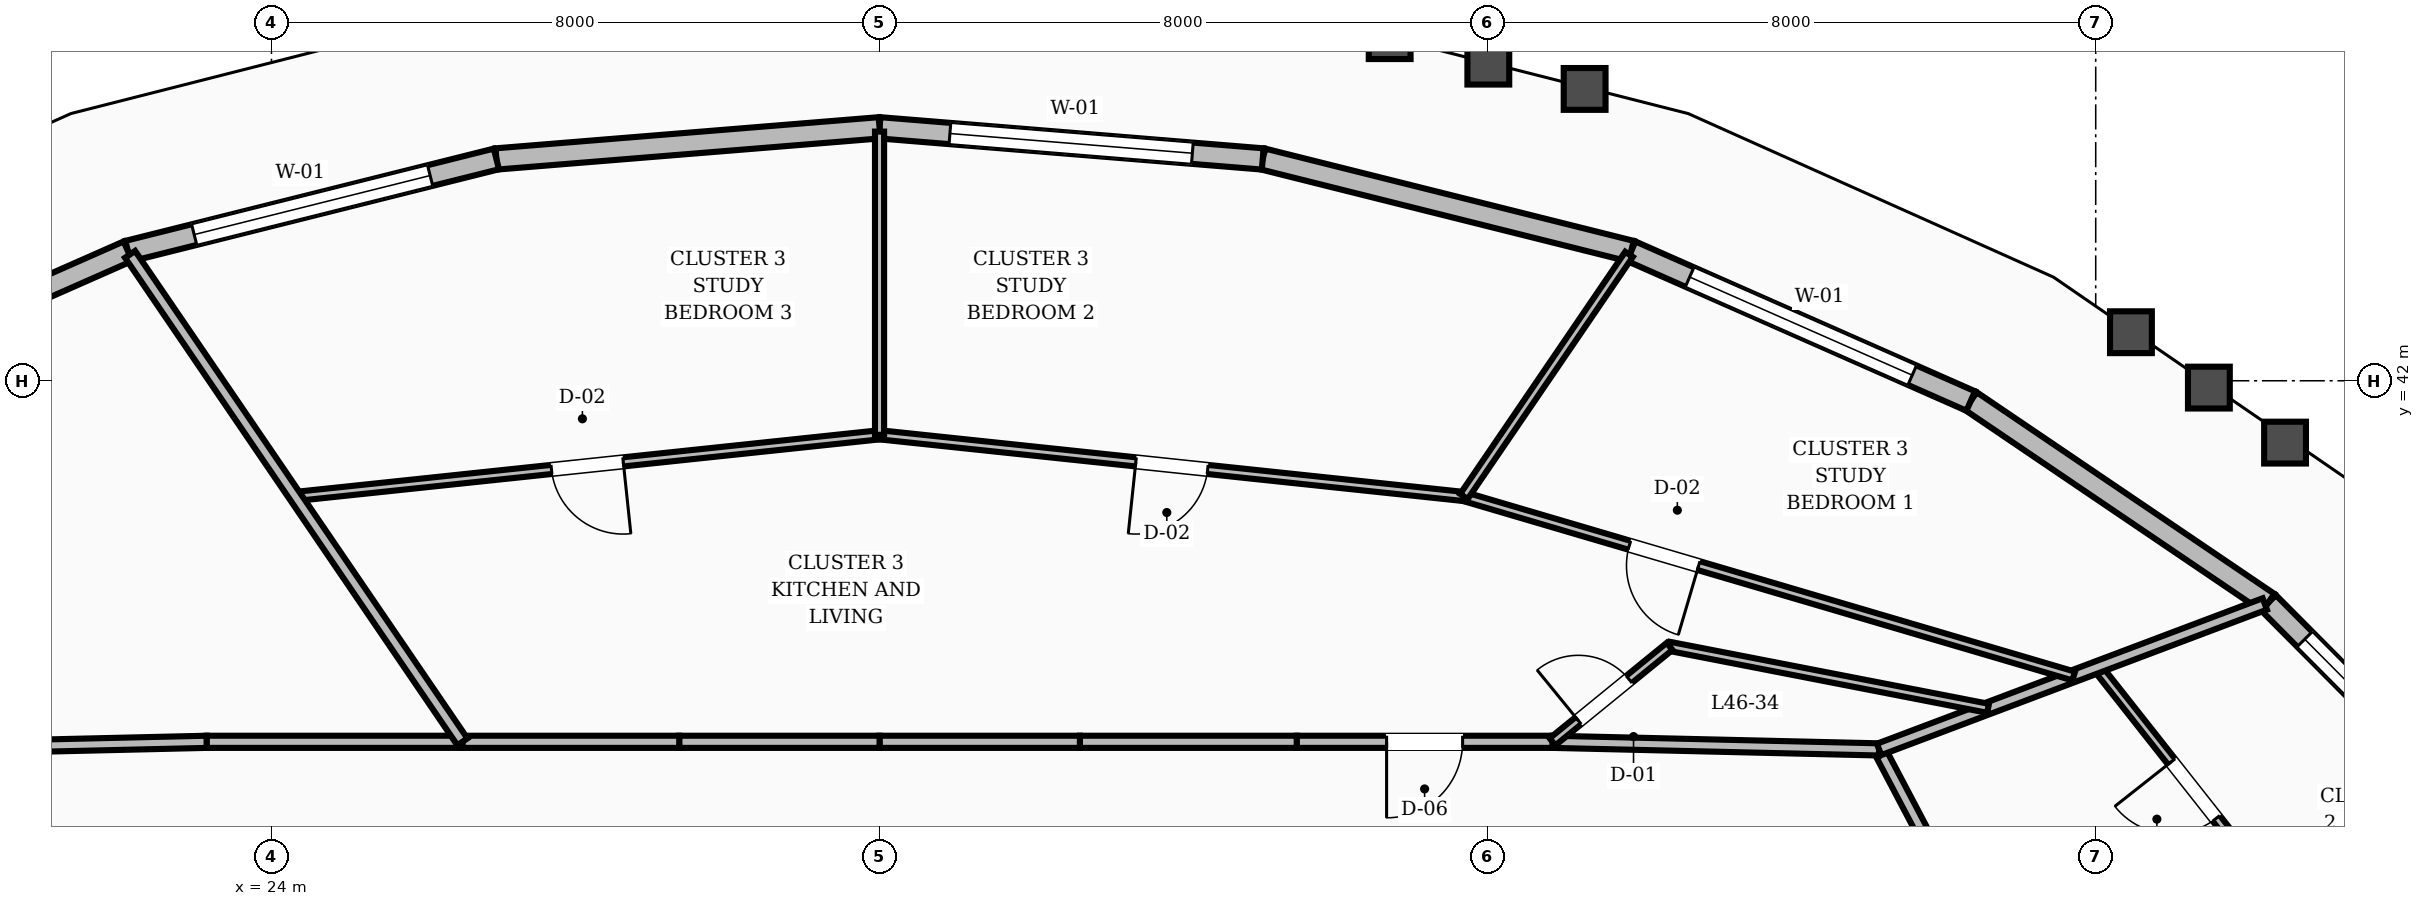
"""IFC4 building model, lengths in metres.
Left out: names, types, materials, properties, quantities, classifications, styles, units other than length and angle.
Written with IfcOpenShell. Run it as: python <this file> out.ifc"""

import sys

from ifc_helpers import new_model, si_unit, direction, frame, frame_2d, origin, place, context, subcontext, project, spatial, rectangle, extrude, element, fill, save


model = new_model("IFC4")
c1 = context("Model", 3, precision=1e-05, world=origin(), true_north=direction((0.0, 1.0)))
c2 = subcontext(c1, "Body", "Model", "MODEL_VIEW")
j1 = project(units=[si_unit("LENGTHUNIT", "METRE"), si_unit("PLANEANGLEUNIT", "RADIAN")], contexts=[c1])
p1 = place(None, origin())
s1 = spatial("IfcSite", under=j1, at=p1, CompositionType="ELEMENT")
p2 = place(p1, origin())
s2 = spatial("IfcBuilding", under=s1, at=p2, CompositionType="ELEMENT")
p3 = place(p2, frame((0.0, 0.0, 178.4)))
s3 = spatial("IfcBuildingStorey", under=s2, at=p3, CompositionType="ELEMENT", Elevation=178.4)
p4 = place(p3, frame((53.485, 35.849, 0.0), z_axis=(0.0, 0.0, 1.0), x_axis=(-0.705095186085, 0.709112669862, 0.0)))
e1 = element("IfcWall", 1, at=p4, inside=s3, PredefinedType="STANDARD", context=c2, shape_type="SweptSolid", body=[
    extrude(rectangle(XDim=4.558, YDim=0.28, at=frame_2d((2.279, 0.0))), origin(), (0.0, 0.0, 1.0), 2.82),
])
p5 = place(p4, frame((0.679, 0.0, 0.8)))
e2 = element("IfcOpeningElement", 2, at=p5, cuts=e1, PredefinedType="OPENING", context=c2, shape_type="SweptSolid", body=[
    extrude(rectangle(XDim=3.2, YDim=1.65, at=frame_2d((1.6, 0.825))), frame((0.0, 0.15, 0.0), z_axis=(0.0, -1.0, 0.0), x_axis=(1.0, 0.0, 0.0)), (0.0, 0.0, 1.0), 0.3),
])
p6 = place(p3, frame((50.271, 39.081, 0.0), z_axis=(0.0, 0.0, 1.0), x_axis=(-0.827929515697, 0.560832164767, 0.0)))
e3 = element("IfcWall", 3, at=p6, inside=s3, PredefinedType="STANDARD", context=c2, shape_type="SweptSolid", body=[
    extrude(rectangle(XDim=4.729, YDim=0.28, at=frame_2d((2.365, 0.0))), origin(), (0.0, 0.0, 1.0), 2.82),
])
p7 = place(p3, frame((46.356, 41.733, 0.0), z_axis=(0.0, 0.0, 1.0), x_axis=(-0.914919430765, 0.40363651372, 0.0)))
e4 = element("IfcWall", 4, at=p7, inside=s3, PredefinedType="STANDARD", context=c2, shape_type="SweptSolid", body=[
    extrude(rectangle(XDim=4.883, YDim=0.28, at=frame_2d((2.441, 0.0))), origin(), (0.0, 0.0, 1.0), 2.82),
])
p8 = place(p7, frame((0.841, 0.0, 0.8)))
e5 = element("IfcOpeningElement", 5, at=p8, cuts=e4, PredefinedType="OPENING", context=c2, shape_type="SweptSolid", body=[
    extrude(rectangle(XDim=3.2, YDim=1.65, at=frame_2d((1.6, 0.825))), frame((0.0, 0.15, 0.0), z_axis=(0.0, -1.0, 0.0), x_axis=(1.0, 0.0, 0.0)), (0.0, 0.0, 1.0), 0.3),
])
p9 = place(p3, frame((41.888, 43.704, 0.0), z_axis=(0.0, 0.0, 1.0), x_axis=(-0.970044703594, 0.242926476593, 0.0)))
e6 = element("IfcWall", 6, at=p9, inside=s3, PredefinedType="STANDARD", context=c2, shape_type="SweptSolid", body=[
    extrude(rectangle(XDim=4.997, YDim=0.28, at=frame_2d((2.499, 0.0))), origin(), (0.0, 0.0, 1.0), 2.82),
])
p10 = place(p3, frame((37.041, 44.918, 0.0), z_axis=(0.0, 0.0, 1.0), x_axis=(-0.99671410823, 0.080999916389, 0.0)))
e7 = element("IfcWall", 7, at=p10, inside=s3, PredefinedType="STANDARD", context=c2, shape_type="SweptSolid", body=[
    extrude(rectangle(XDim=5.058, YDim=0.28, at=frame_2d((2.529, 0.0))), origin(), (0.0, 0.0, 1.0), 2.82),
])
p11 = place(p10, frame((0.929, 0.0, 0.8)))
e8 = element("IfcOpeningElement", 8, at=p11, cuts=e7, PredefinedType="OPENING", context=c2, shape_type="SweptSolid", body=[
    extrude(rectangle(XDim=3.2, YDim=1.65, at=frame_2d((1.6, 0.825))), frame((0.0, 0.15, 0.0), z_axis=(0.0, -1.0, 0.0), x_axis=(1.0, 0.0, 0.0)), (0.0, 0.0, 1.0), 0.3),
])
p12 = place(p3, frame((32.0, 45.328, 0.0), z_axis=(0.0, 0.0, 1.0), x_axis=(-0.99671410823, -0.080999916389, 0.0)))
e9 = element("IfcWall", 9, at=p12, inside=s3, PredefinedType="STANDARD", context=c2, shape_type="SweptSolid", body=[
    extrude(rectangle(XDim=5.058, YDim=0.28, at=frame_2d((2.529, 0.0))), origin(), (0.0, 0.0, 1.0), 2.82),
])
p13 = place(p3, frame((26.959, 44.918, 0.0), z_axis=(0.0, 0.0, 1.0), x_axis=(-0.970044703594, -0.242926476593, 0.0)))
e10 = element("IfcWall", 10, at=p13, inside=s3, PredefinedType="STANDARD", context=c2, shape_type="SweptSolid", body=[
    extrude(rectangle(XDim=4.997, YDim=0.28, at=frame_2d((2.499, 0.0))), origin(), (0.0, 0.0, 1.0), 2.82),
])
p14 = place(p13, frame((0.898, 0.0, 0.8)))
e11 = element("IfcOpeningElement", 11, at=p14, cuts=e10, PredefinedType="OPENING", context=c2, shape_type="SweptSolid", body=[
    extrude(rectangle(XDim=3.2, YDim=1.65, at=frame_2d((1.6, 0.825))), frame((0.0, 0.15, 0.0), z_axis=(0.0, -1.0, 0.0), x_axis=(1.0, 0.0, 0.0)), (0.0, 0.0, 1.0), 0.3),
])
p15 = place(p3, frame((22.112, 43.704, 0.0), z_axis=(0.0, 0.0, 1.0), x_axis=(-0.914919430765, -0.40363651372, 0.0)))
e12 = element("IfcWall", 12, at=p15, inside=s3, PredefinedType="STANDARD", context=c2, shape_type="SweptSolid", body=[
    extrude(rectangle(XDim=4.883, YDim=0.28, at=frame_2d((2.441, 0.0))), origin(), (0.0, 0.0, 1.0), 2.82),
])
p16 = place(p3, frame((46.85, 33.923, 0.0), z_axis=(0.0, 0.0, 1.0), x_axis=(-0.466093963429, 0.884735224378, 0.0)))
e13 = element("IfcWall", 13, at=p16, inside=s3, PredefinedType="SOLIDWALL", context=c2, shape_type="SweptSolid", body=[
    extrude(rectangle(XDim=3.648, YDim=0.16, at=frame_2d((1.824, 0.0))), origin(), (0.0, 0.0, 1.0), 2.8),
])
p17 = place(p3, frame((45.15, 37.15, 0.0), z_axis=(0.0, 0.0, 1.0), x_axis=(-0.999728709658, 0.023291781507, 0.0)))
e14 = element("IfcWall", 14, at=p17, inside=s3, PredefinedType="SOLIDWALL", context=c2, shape_type="SweptSolid", body=[
    extrude(rectangle(XDim=4.298, YDim=0.16, at=frame_2d((2.149, 0.0))), origin(), (0.0, 0.0, 1.0), 2.8),
])
p18 = place(p3, frame((40.854, 37.25, 0.0), z_axis=(0.0, 0.0, 1.0), x_axis=(-1.0, 0.0, 0.0)))
e15 = element("IfcWall", 15, at=p18, inside=s3, PredefinedType="SOLIDWALL", context=c2, shape_type="SweptSolid", body=[
    extrude(rectangle(XDim=3.365, YDim=0.16, at=frame_2d((1.683, 0.0))), origin(), (0.0, 0.0, 1.0), 2.8),
])
p19 = place(p18, frame((1.183, 0.0, 0.0)))
e16 = element("IfcOpeningElement", 16, at=p19, cuts=e15, PredefinedType="OPENING", context=c2, shape_type="SweptSolid", body=[
    extrude(rectangle(XDim=1.0, YDim=2.1, at=frame_2d((0.5, 1.05))), frame((0.0, 0.09, 0.0), z_axis=(0.0, -1.0, 0.0), x_axis=(1.0, 0.0, 0.0)), (0.0, 0.0, 1.0), 0.18),
])
p20 = place(p3, frame((37.488, 37.25, 0.0), z_axis=(0.0, 0.0, 1.0), x_axis=(-1.0, 0.0, 0.0)))
e17 = element("IfcWall", 17, at=p20, inside=s3, PredefinedType="SOLIDWALL", context=c2, shape_type="SweptSolid", body=[
    extrude(rectangle(XDim=2.853, YDim=0.16, at=frame_2d((1.426, 0.0))), origin(), (0.0, 0.0, 1.0), 2.8),
])
for number, where, z_axis, x_axis in (
    (18, (34.635, 37.25, 0.0), (0.0, 0.0, 1.0), (-1.0, 0.0, 0.0)),
    (19, (32.0, 37.25, 0.0), (0.0, 0.0, 1.0), (-1.0, 0.0, 0.0)),
):
    element("IfcWall", number, at=place(p3, frame(where, z_axis=z_axis, x_axis=x_axis)), inside=s3, PredefinedType="SOLIDWALL", context=c2, shape_type="SweptSolid", body=[
        extrude(rectangle(XDim=2.635, YDim=0.16, at=frame_2d((1.318, 0.0))), origin(), (0.0, 0.0, 1.0), 2.8),
    ])
p21 = place(p3, frame((29.365, 37.25, 0.0), z_axis=(0.0, 0.0, 1.0), x_axis=(-1.0, 0.0, 0.0)))
e20 = element("IfcWall", 20, at=p21, inside=s3, PredefinedType="SOLIDWALL", context=c2, shape_type="SweptSolid", body=[
    extrude(rectangle(XDim=2.853, YDim=0.16, at=frame_2d((1.426, 0.0))), origin(), (0.0, 0.0, 1.0), 2.8),
])
p22 = place(p3, frame((26.512, 37.25, 0.0), z_axis=(0.0, 0.0, 1.0), x_axis=(-1.0, 0.0, 0.0)))
e21 = element("IfcWall", 21, at=p22, inside=s3, PredefinedType="SOLIDWALL", context=c2, shape_type="SweptSolid", body=[
    extrude(rectangle(XDim=3.365, YDim=0.16, at=frame_2d((1.683, 0.0))), origin(), (0.0, 0.0, 1.0), 2.8),
])
p23 = place(p3, frame((23.146, 37.25, 0.0), z_axis=(0.0, 0.0, 1.0), x_axis=(-0.999728709658, -0.023291781507, 0.0)))
e22 = element("IfcWall", 22, at=p23, inside=s3, PredefinedType="SOLIDWALL", context=c2, shape_type="SweptSolid", body=[
    extrude(rectangle(XDim=4.298, YDim=0.16, at=frame_2d((2.149, 0.0))), origin(), (0.0, 0.0, 1.0), 2.8),
])
p24 = place(p3, frame((50.565, 35.001, 0.0), z_axis=(0.0, 0.0, 1.0), x_axis=(-0.619288242801, 0.785163723263, 0.0)))
e23 = element("IfcWall", 23, at=p24, inside=s3, PredefinedType="PARTITIONING", context=c2, shape_type="SweptSolid", body=[
    extrude(rectangle(XDim=4.114, YDim=0.12, at=frame_2d((2.057, 0.0))), origin(), (0.0, 0.0, 1.0), 2.8),
])
p25 = place(p24, frame((1.582, 0.0, 0.0)))
e24 = element("IfcOpeningElement", 24, at=p25, cuts=e23, PredefinedType="OPENING", context=c2, shape_type="SweptSolid", body=[
    extrude(rectangle(XDim=0.95, YDim=2.1, at=frame_2d((0.475, 1.05))), frame((0.0, 0.07, 0.0), z_axis=(0.0, -1.0, 0.0), x_axis=(1.0, 0.0, 0.0)), (0.0, 0.0, 1.0), 0.14),
])
p26 = place(p3, frame((45.15, 37.15, 0.0), z_axis=(0.0, 0.0, 1.0), x_axis=(0.935687541553, 0.3528297388, 0.0)))
e25 = element("IfcWall", 25, at=p26, inside=s3, PredefinedType="SOLIDWALL", context=c2, shape_type="SweptSolid", body=[
    extrude(rectangle(XDim=5.424, YDim=0.16, at=frame_2d((2.712, 0.0))), origin(), (0.0, 0.0, 1.0), 2.8),
])
p27 = place(p3, frame((46.584, 37.691, 0.0), z_axis=(0.0, 0.0, 1.0), x_axis=(-0.981615985024, 0.190866597251, 0.0)))
e26 = element("IfcWall", 26, at=p27, inside=s3, PredefinedType="PARTITIONING", context=c2, shape_type="SweptSolid", body=[
    extrude(rectangle(XDim=4.268, YDim=0.12, at=frame_2d((2.134, 0.0))), origin(), (0.0, 0.0, 1.0), 2.8),
])
p28 = place(p3, frame((40.854, 37.25, 0.0), z_axis=(0.0, 0.0, 1.0), x_axis=(0.775203790186, 0.631711234411, 0.0)))
e27 = element("IfcWall", 27, at=p28, inside=s3, PredefinedType="PARTITIONING", context=c2, shape_type="SweptSolid", body=[
    extrude(rectangle(XDim=1.987, YDim=0.12, at=frame_2d((0.994, 0.0))), origin(), (0.0, 0.0, 1.0), 2.8),
])
p29 = place(p28, frame((0.44, 0.0, 0.0)))
e28 = element("IfcOpeningElement", 28, at=p29, cuts=e27, PredefinedType="OPENING", context=c2, shape_type="SweptSolid", body=[
    extrude(rectangle(XDim=0.86, YDim=2.1, at=frame_2d((0.43, 1.05))), frame((0.0, 0.07, 0.0), z_axis=(0.0, -1.0, 0.0), x_axis=(1.0, 0.0, 0.0)), (0.0, 0.0, 1.0), 0.14),
])
p30 = place(p3, frame((47.711, 38.115, 0.0), z_axis=(0.0, 0.0, 1.0), x_axis=(-0.959292020944, 0.282416038059, 0.0)))
e29 = element("IfcWall", 29, at=p30, inside=s3, PredefinedType="PARTITIONING", context=c2, shape_type="SweptSolid", body=[
    extrude(rectangle(XDim=8.363, YDim=0.12, at=frame_2d((4.181, 0.0))), origin(), (0.0, 0.0, 1.0), 2.8),
])
p31 = place(p30, frame((5.144, 0.0, 0.0)))
e30 = element("IfcOpeningElement", 30, at=p31, cuts=e29, PredefinedType="OPENING", context=c2, shape_type="SweptSolid", body=[
    extrude(rectangle(XDim=0.95, YDim=2.1, at=frame_2d((0.475, 1.05))), frame((0.0, 0.07, 0.0), z_axis=(0.0, -1.0, 0.0), x_axis=(1.0, 0.0, 0.0)), (0.0, 0.0, 1.0), 0.14),
])
p32 = place(p3, frame((39.688, 40.477, 0.0), z_axis=(0.0, 0.0, 1.0), x_axis=(-0.994475302954, 0.104970814106, 0.0)))
e31 = element("IfcWall", 31, at=p32, inside=s3, PredefinedType="PARTITIONING", context=c2, shape_type="SweptSolid", body=[
    extrude(rectangle(XDim=7.731, YDim=0.12, at=frame_2d((3.865, 0.0))), origin(), (0.0, 0.0, 1.0), 2.8),
])
p33 = place(p32, frame((3.39, 0.0, 0.0)))
e32 = element("IfcOpeningElement", 32, at=p33, cuts=e31, PredefinedType="OPENING", context=c2, shape_type="SweptSolid", body=[
    extrude(rectangle(XDim=0.95, YDim=2.1, at=frame_2d((0.475, 1.05))), frame((0.0, 0.07, 0.0), z_axis=(0.0, -1.0, 0.0), x_axis=(1.0, 0.0, 0.0)), (0.0, 0.0, 1.0), 0.14),
])
p34 = place(p3, frame((39.688, 40.477, 0.0), z_axis=(0.0, 0.0, 1.0), x_axis=(0.56329163375, 0.826258152968, 0.0)))
e33 = element("IfcWall", 33, at=p34, inside=s3, PredefinedType="PARTITIONING", context=c2, shape_type="SweptSolid", body=[
    extrude(rectangle(XDim=3.856, YDim=0.12, at=frame_2d((1.928, 0.0))), origin(), (0.0, 0.0, 1.0), 2.8),
])
p35 = place(p3, frame((32.0, 41.289, 0.0), z_axis=(0.0, 0.0, 1.0), x_axis=(-0.994475302954, -0.104970814106, 0.0)))
e34 = element("IfcWall", 34, at=p35, inside=s3, PredefinedType="PARTITIONING", context=c2, shape_type="SweptSolid", body=[
    extrude(rectangle(XDim=7.731, YDim=0.12, at=frame_2d((3.865, 0.0))), origin(), (0.0, 0.0, 1.0), 2.8),
])
p36 = place(p35, frame((3.39, 0.0, 0.0)))
e35 = element("IfcOpeningElement", 35, at=p36, cuts=e34, PredefinedType="OPENING", context=c2, shape_type="SweptSolid", body=[
    extrude(rectangle(XDim=0.95, YDim=2.1, at=frame_2d((0.475, 1.05))), frame((0.0, 0.07, 0.0), z_axis=(0.0, -1.0, 0.0), x_axis=(1.0, 0.0, 0.0)), (0.0, 0.0, 1.0), 0.14),
])
p37 = place(p3, frame((32.0, 41.289, 0.0), z_axis=(0.0, 0.0, 1.0), x_axis=(0.0, 1.0, 0.0)))
e36 = element("IfcWall", 36, at=p37, inside=s3, PredefinedType="PARTITIONING", context=c2, shape_type="SweptSolid", body=[
    extrude(rectangle(XDim=3.989, YDim=0.12, at=frame_2d((1.995, 0.0))), origin(), (0.0, 0.0, 1.0), 2.8),
])
p38 = place(p3, frame((26.512, 37.25, 0.0), z_axis=(0.0, 0.0, 1.0), x_axis=(-0.563272403626, 0.826271262548, 0.0)))
e37 = element("IfcWall", 37, at=p38, inside=s3, PredefinedType="SOLIDWALL", context=c2, shape_type="SweptSolid", body=[
    extrude(rectangle(XDim=7.761, YDim=0.16, at=frame_2d((3.881, 0.0))), origin(), (0.0, 0.0, 1.0), 2.8),
])
p39 = place(p5, origin())
e38 = element("IfcWindow", 38, at=p39, inside=s3, PartitioningType="SINGLE_PANEL", PredefinedType="WINDOW", context=c2, shape_type="SweptSolid", body=[
    extrude(rectangle(XDim=3.2, YDim=1.65, at=frame_2d((1.6, 0.825))), frame((0.0, 0.03, 0.0), z_axis=(0.0, -1.0, 0.0), x_axis=(1.0, 0.0, 0.0)), (0.0, 0.0, 1.0), 0.06),
])
fill(e2, e38)
p40 = place(p8, origin())
e39 = element("IfcWindow", 39, at=p40, inside=s3, PartitioningType="SINGLE_PANEL", PredefinedType="WINDOW", context=c2, shape_type="SweptSolid", body=[
    extrude(rectangle(XDim=3.2, YDim=1.65, at=frame_2d((1.6, 0.825))), frame((0.0, 0.03, 0.0), z_axis=(0.0, -1.0, 0.0), x_axis=(1.0, 0.0, 0.0)), (0.0, 0.0, 1.0), 0.06),
])
fill(e5, e39)
p41 = place(p11, origin())
e40 = element("IfcWindow", 40, at=p41, inside=s3, PartitioningType="SINGLE_PANEL", PredefinedType="WINDOW", context=c2, shape_type="SweptSolid", body=[
    extrude(rectangle(XDim=3.2, YDim=1.65, at=frame_2d((1.6, 0.825))), frame((0.0, 0.03, 0.0), z_axis=(0.0, -1.0, 0.0), x_axis=(1.0, 0.0, 0.0)), (0.0, 0.0, 1.0), 0.06),
])
fill(e8, e40)
p42 = place(p14, origin())
e41 = element("IfcWindow", 41, at=p42, inside=s3, PartitioningType="SINGLE_PANEL", PredefinedType="WINDOW", context=c2, shape_type="SweptSolid", body=[
    extrude(rectangle(XDim=3.2, YDim=1.65, at=frame_2d((1.6, 0.825))), frame((0.0, 0.03, 0.0), z_axis=(0.0, -1.0, 0.0), x_axis=(1.0, 0.0, 0.0)), (0.0, 0.0, 1.0), 0.06),
])
fill(e11, e41)
p43 = place(p25, origin())
e42 = element("IfcDoor", 42, at=p43, inside=s3, OperationType="SINGLE_SWING_RIGHT", PredefinedType="DOOR", context=c2, shape_type="SweptSolid", body=[
    extrude(rectangle(XDim=0.95, YDim=2.1, at=frame_2d((0.475, 1.05))), frame((0.0, 0.025, 0.0), z_axis=(0.0, -1.0, 0.0), x_axis=(1.0, 0.0, 0.0)), (0.0, 0.0, 1.0), 0.05),
])
fill(e24, e42)
p44 = place(p29, origin())
e43 = element("IfcDoor", 43, at=p44, inside=s3, OperationType="SINGLE_SWING_LEFT", PredefinedType="DOOR", context=c2, shape_type="SweptSolid", body=[
    extrude(rectangle(XDim=0.86, YDim=2.1, at=frame_2d((0.43, 1.05))), frame((0.0, 0.025, 0.0), z_axis=(0.0, -1.0, 0.0), x_axis=(1.0, 0.0, 0.0)), (0.0, 0.0, 1.0), 0.05),
])
fill(e28, e43)
p45 = place(p19, origin())
e44 = element("IfcDoor", 44, at=p45, inside=s3, OperationType="SINGLE_SWING_RIGHT", PredefinedType="DOOR", context=c2, shape_type="SweptSolid", body=[
    extrude(rectangle(XDim=1.0, YDim=2.1, at=frame_2d((0.5, 1.05))), frame((0.0, 0.025, 0.0), z_axis=(0.0, -1.0, 0.0), x_axis=(1.0, 0.0, 0.0)), (0.0, 0.0, 1.0), 0.05),
])
fill(e16, e44)
p46 = place(p31, origin())
e45 = element("IfcDoor", 45, at=p46, inside=s3, OperationType="SINGLE_SWING_LEFT", PredefinedType="DOOR", context=c2, shape_type="SweptSolid", body=[
    extrude(rectangle(XDim=0.95, YDim=2.1, at=frame_2d((0.475, 1.05))), frame((0.0, 0.025, 0.0), z_axis=(0.0, -1.0, 0.0), x_axis=(1.0, 0.0, 0.0)), (0.0, 0.0, 1.0), 0.05),
])
fill(e30, e45)
p47 = place(p33, origin())
e46 = element("IfcDoor", 46, at=p47, inside=s3, OperationType="SINGLE_SWING_RIGHT", PredefinedType="DOOR", context=c2, shape_type="SweptSolid", body=[
    extrude(rectangle(XDim=0.95, YDim=2.1, at=frame_2d((0.475, 1.05))), frame((0.0, 0.025, 0.0), z_axis=(0.0, -1.0, 0.0), x_axis=(1.0, 0.0, 0.0)), (0.0, 0.0, 1.0), 0.05),
])
fill(e32, e46)
p48 = place(p36, origin())
e47 = element("IfcDoor", 47, at=p48, inside=s3, OperationType="SINGLE_SWING_LEFT", PredefinedType="DOOR", context=c2, shape_type="SweptSolid", body=[
    extrude(rectangle(XDim=0.95, YDim=2.1, at=frame_2d((0.475, 1.05))), frame((0.0, 0.025, 0.0), z_axis=(0.0, -1.0, 0.0), x_axis=(1.0, 0.0, 0.0)), (0.0, 0.0, 1.0), 0.05),
])
fill(e35, e47)
save(model, sys.argv[1])
